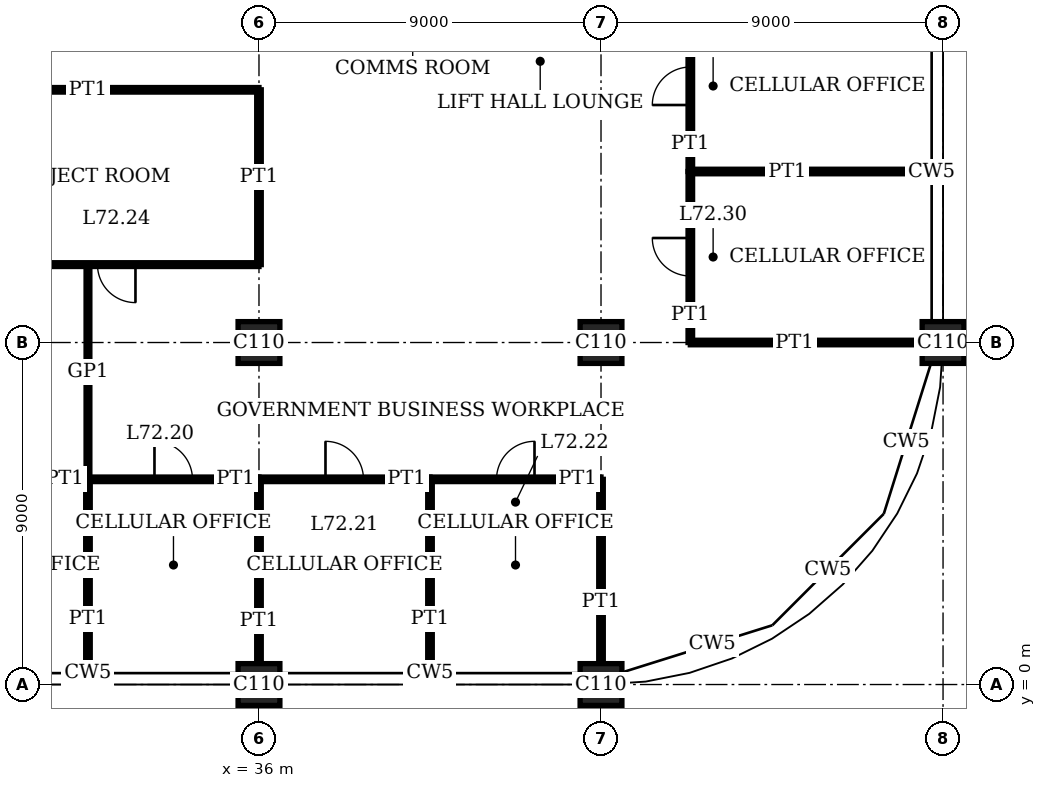
"""IFC4 building model, lengths in metres.
Left out: names, types, materials, properties, quantities, classifications, styles, units other than length and angle.
Written with IfcOpenShell. Run it as: python <this file> out.ifc"""

import sys

from ifc_helpers import new_model, si_unit, direction, frame, frame_2d, origin, origin_2d, place, context, subcontext, project, spatial, rectangle, extrude, element, fill, save


model = new_model("IFC4")
c1 = context("Model", 3, precision=1e-05, world=origin(), true_north=direction((0.0, 1.0)))
c2 = subcontext(c1, "Body", "Model", "MODEL_VIEW")
j1 = project(units=[si_unit("LENGTHUNIT", "METRE"), si_unit("PLANEANGLEUNIT", "RADIAN")], contexts=[c1])
p1 = place(None, origin())
s1 = spatial("IfcSite", under=j1, at=p1, CompositionType="ELEMENT")
p2 = place(p1, origin())
s2 = spatial("IfcBuilding", under=s1, at=p2, CompositionType="ELEMENT")
p3 = place(p2, frame((0.0, 0.0, 295.4)))
s3 = spatial("IfcBuildingStorey", under=s2, at=p3, CompositionType="ELEMENT", Elevation=295.4)
for number, where, z_axis, x_axis in (
    (1, (36.0, 0.0, 0.0), (0.0, 0.0, 1.0), (1.0, 0.0, 0.0)),
    (2, (36.0, 9.0, 0.0), (0.0, 0.0, 1.0), (1.0, 0.0, 0.0)),
    (3, (45.0, 0.0, 0.0), (0.0, 0.0, 1.0), (1.0, 0.0, 0.0)),
    (4, (45.0, 9.0, 0.0), (0.0, 0.0, 1.0), (1.0, 0.0, 0.0)),
    (5, (54.0, 9.0, 0.0), (0.0, 0.0, 1.0), (1.0, 0.0, 0.0)),
):
    element("IfcColumn", number, at=place(p3, frame(where, z_axis=z_axis, x_axis=x_axis)), inside=s3, PredefinedType="COLUMN", context=c2, shape_type="SweptSolid", body=[
        extrude(rectangle(XDim=1.1, YDim=1.1, at=origin_2d()), origin(), (0.0, 0.0, 1.0), 4.0),
    ])
p4 = place(p3, frame((27.0, 5.4, 0.0), z_axis=(0.0, 0.0, 1.0), x_axis=(1.0, 0.0, 0.0)))
e6 = element("IfcWall", 6, at=p4, inside=s3, PredefinedType="PARTITIONING", context=c2, shape_type="SweptSolid", body=[
    extrude(rectangle(XDim=4.5, YDim=0.12, at=frame_2d((2.25, 0.0))), origin(), (0.0, 0.0, 1.0), 3.75),
])
p5 = place(p4, frame((1.75, 0.0, 0.0)))
e7 = element("IfcOpeningElement", 7, at=p5, cuts=e6, PredefinedType="OPENING", context=c2, shape_type="SweptSolid", body=[
    extrude(rectangle(XDim=1.0, YDim=2.4, at=frame_2d((0.5, 1.2))), frame((0.0, 0.07, 0.0), z_axis=(0.0, -1.0, 0.0), x_axis=(1.0, 0.0, 0.0)), (0.0, 0.0, 1.0), 0.14),
])
p6 = place(p3, frame((31.5, 5.4, 0.0), z_axis=(0.0, 0.0, 1.0), x_axis=(1.0, 0.0, 0.0)))
e8 = element("IfcWall", 8, at=p6, inside=s3, PredefinedType="PARTITIONING", context=c2, shape_type="SweptSolid", body=[
    extrude(rectangle(XDim=4.5, YDim=0.12, at=frame_2d((2.25, 0.0))), origin(), (0.0, 0.0, 1.0), 3.75),
])
p7 = place(p6, frame((1.75, 0.0, 0.0)))
e9 = element("IfcOpeningElement", 9, at=p7, cuts=e8, PredefinedType="OPENING", context=c2, shape_type="SweptSolid", body=[
    extrude(rectangle(XDim=1.0, YDim=2.4, at=frame_2d((0.5, 1.2))), frame((0.0, 0.07, 0.0), z_axis=(0.0, -1.0, 0.0), x_axis=(1.0, 0.0, 0.0)), (0.0, 0.0, 1.0), 0.14),
])
p8 = place(p3, frame((36.0, 5.4, 0.0), z_axis=(0.0, 0.0, 1.0), x_axis=(1.0, 0.0, 0.0)))
e10 = element("IfcWall", 10, at=p8, inside=s3, PredefinedType="PARTITIONING", context=c2, shape_type="SweptSolid", body=[
    extrude(rectangle(XDim=4.5, YDim=0.12, at=frame_2d((2.25, 0.0))), origin(), (0.0, 0.0, 1.0), 3.75),
])
p9 = place(p8, frame((1.75, 0.0, 0.0)))
e11 = element("IfcOpeningElement", 11, at=p9, cuts=e10, PredefinedType="OPENING", context=c2, shape_type="SweptSolid", body=[
    extrude(rectangle(XDim=1.0, YDim=2.4, at=frame_2d((0.5, 1.2))), frame((0.0, 0.07, 0.0), z_axis=(0.0, -1.0, 0.0), x_axis=(1.0, 0.0, 0.0)), (0.0, 0.0, 1.0), 0.14),
])
p10 = place(p3, frame((40.5, 5.4, 0.0), z_axis=(0.0, 0.0, 1.0), x_axis=(1.0, 0.0, 0.0)))
e12 = element("IfcWall", 12, at=p10, inside=s3, PredefinedType="PARTITIONING", context=c2, shape_type="SweptSolid", body=[
    extrude(rectangle(XDim=4.5, YDim=0.12, at=frame_2d((2.25, 0.0))), origin(), (0.0, 0.0, 1.0), 3.75),
])
p11 = place(p10, frame((1.75, 0.0, 0.0)))
e13 = element("IfcOpeningElement", 13, at=p11, cuts=e12, PredefinedType="OPENING", context=c2, shape_type="SweptSolid", body=[
    extrude(rectangle(XDim=1.0, YDim=2.4, at=frame_2d((0.5, 1.2))), frame((0.0, 0.07, 0.0), z_axis=(0.0, -1.0, 0.0), x_axis=(1.0, 0.0, 0.0)), (0.0, 0.0, 1.0), 0.14),
])
p12 = place(p3, frame((47.35, 9.0, 0.0), z_axis=(0.0, 0.0, 1.0), x_axis=(1.0, 0.0, 0.0)))
e14 = element("IfcWall", 14, at=p12, inside=s3, PredefinedType="PARTITIONING", context=c2, shape_type="SweptSolid", body=[
    extrude(rectangle(XDim=6.1, YDim=0.12, at=frame_2d((3.05, 0.0))), origin(), (0.0, 0.0, 1.0), 3.05),
])
p13 = place(p3, frame((27.0, 11.05, 0.0), z_axis=(0.0, 0.0, 1.0), x_axis=(1.0, 0.0, 0.0)))
e15 = element("IfcWall", 15, at=p13, inside=s3, PredefinedType="PARTITIONING", context=c2, shape_type="SweptSolid", body=[
    extrude(rectangle(XDim=9.0, YDim=0.1, at=frame_2d((4.5, 0.0))), origin(), (0.0, 0.0, 1.0), 3.75),
])
p14 = place(p13, frame((4.75, 0.0, 0.0)))
e16 = element("IfcOpeningElement", 16, at=p14, cuts=e15, PredefinedType="OPENING", context=c2, shape_type="SweptSolid", body=[
    extrude(rectangle(XDim=1.0, YDim=2.4, at=frame_2d((0.5, 1.2))), frame((0.0, 0.06, 0.0), z_axis=(0.0, -1.0, 0.0), x_axis=(1.0, 0.0, 0.0)), (0.0, 0.0, 1.0), 0.12),
])
p15 = place(p3, frame((47.35, 13.5, 0.0), z_axis=(0.0, 0.0, 1.0), x_axis=(1.0, 0.0, 0.0)))
e17 = element("IfcWall", 17, at=p15, inside=s3, PredefinedType="PARTITIONING", context=c2, shape_type="SweptSolid", body=[
    extrude(rectangle(XDim=6.34, YDim=0.12, at=frame_2d((3.17, 0.0))), origin(), (0.0, 0.0, 1.0), 3.1),
])
p16 = place(p3, frame((27.0, 15.65, 0.0), z_axis=(0.0, 0.0, 1.0), x_axis=(1.0, 0.0, 0.0)))
e18 = element("IfcWall", 18, at=p16, inside=s3, PredefinedType="PARTITIONING", context=c2, shape_type="SweptSolid", body=[
    extrude(rectangle(XDim=9.0, YDim=0.12, at=frame_2d((4.5, 0.0))), origin(), (0.0, 0.0, 1.0), 3.75),
])
p17 = place(p3, frame((31.5, 0.31, 0.0), z_axis=(0.0, 0.0, 1.0), x_axis=(0.0, 1.0, 0.0)))
e19 = element("IfcWall", 19, at=p17, inside=s3, PredefinedType="PARTITIONING", context=c2, shape_type="SweptSolid", body=[
    extrude(rectangle(XDim=5.09, YDim=0.12, at=frame_2d((2.545, 0.0))), origin(), (0.0, 0.0, 1.0), 3.75),
])
p18 = place(p3, frame((31.5, 5.4, 0.0), z_axis=(0.0, 0.0, 1.0), x_axis=(0.0, 1.0, 0.0)))
e20 = element("IfcWall", 20, at=p18, inside=s3, PredefinedType="PARTITIONING", context=c2, shape_type="SweptSolid", body=[
    extrude(rectangle(XDim=5.66, YDim=0.1, at=frame_2d((2.83, 0.0))), origin(), (0.0, 0.0, 1.0), 3.75),
])
p19 = place(p3, frame((36.0, 0.55, 0.0), z_axis=(0.0, 0.0, 1.0), x_axis=(0.0, 1.0, 0.0)))
e21 = element("IfcWall", 21, at=p19, inside=s3, PredefinedType="PARTITIONING", context=c2, shape_type="SweptSolid", body=[
    extrude(rectangle(XDim=4.85, YDim=0.12, at=frame_2d((2.425, 0.0))), origin(), (0.0, 0.0, 1.0), 3.05),
])
p20 = place(p3, frame((36.0, 11.05, 0.0), z_axis=(0.0, 0.0, 1.0), x_axis=(0.0, 1.0, 0.0)))
e22 = element("IfcWall", 22, at=p20, inside=s3, PredefinedType="PARTITIONING", context=c2, shape_type="SweptSolid", body=[
    extrude(rectangle(XDim=4.6, YDim=0.12, at=frame_2d((2.3, 0.0))), origin(), (0.0, 0.0, 1.0), 3.05),
])
p21 = place(p3, frame((40.5, 0.31, 0.0), z_axis=(0.0, 0.0, 1.0), x_axis=(0.0, 1.0, 0.0)))
e23 = element("IfcWall", 23, at=p21, inside=s3, PredefinedType="PARTITIONING", context=c2, shape_type="SweptSolid", body=[
    extrude(rectangle(XDim=5.09, YDim=0.12, at=frame_2d((2.545, 0.0))), origin(), (0.0, 0.0, 1.0), 3.75),
])
p22 = place(p3, frame((45.0, 0.55, 0.0), z_axis=(0.0, 0.0, 1.0), x_axis=(0.0, 1.0, 0.0)))
e24 = element("IfcWall", 24, at=p22, inside=s3, PredefinedType="PARTITIONING", context=c2, shape_type="SweptSolid", body=[
    extrude(rectangle(XDim=4.85, YDim=0.12, at=frame_2d((2.425, 0.0))), origin(), (0.0, 0.0, 1.0), 3.05),
])
p23 = place(p3, frame((47.35, 9.0, 0.0), z_axis=(0.0, 0.0, 1.0), x_axis=(0.0, 1.0, 0.0)))
e25 = element("IfcWall", 25, at=p23, inside=s3, PredefinedType="PARTITIONING", context=c2, shape_type="SweptSolid", body=[
    extrude(rectangle(XDim=4.5, YDim=0.12, at=frame_2d((2.25, 0.0))), origin(), (0.0, 0.0, 1.0), 3.75),
])
p24 = place(p23, frame((1.75, 0.0, 0.0)))
e26 = element("IfcOpeningElement", 26, at=p24, cuts=e25, PredefinedType="OPENING", context=c2, shape_type="SweptSolid", body=[
    extrude(rectangle(XDim=1.0, YDim=2.4, at=frame_2d((0.5, 1.2))), frame((0.0, 0.07, 0.0), z_axis=(0.0, -1.0, 0.0), x_axis=(1.0, 0.0, 0.0)), (0.0, 0.0, 1.0), 0.14),
])
p25 = place(p3, frame((47.35, 13.5, 0.0), z_axis=(0.0, 0.0, 1.0), x_axis=(0.0, 1.0, 0.0)))
e27 = element("IfcWall", 27, at=p25, inside=s3, PredefinedType="PARTITIONING", context=c2, shape_type="SweptSolid", body=[
    extrude(rectangle(XDim=4.5, YDim=0.12, at=frame_2d((2.25, 0.0))), origin(), (0.0, 0.0, 1.0), 3.75),
])
p26 = place(p25, frame((1.75, 0.0, 0.0)))
e28 = element("IfcOpeningElement", 28, at=p26, cuts=e27, PredefinedType="OPENING", context=c2, shape_type="SweptSolid", body=[
    extrude(rectangle(XDim=1.0, YDim=2.4, at=frame_2d((0.5, 1.2))), frame((0.0, 0.07, 0.0), z_axis=(0.0, -1.0, 0.0), x_axis=(1.0, 0.0, 0.0)), (0.0, 0.0, 1.0), 0.14),
])
p27 = place(p7, origin())
e29 = element("IfcDoor", 29, at=p27, inside=s3, OperationType="SINGLE_SWING_RIGHT", PredefinedType="DOOR", context=c2, shape_type="SweptSolid", body=[
    extrude(rectangle(XDim=1.0, YDim=2.4, at=frame_2d((0.5, 1.2))), frame((0.0, 0.025, 0.0), z_axis=(0.0, -1.0, 0.0), x_axis=(1.0, 0.0, 0.0)), (0.0, 0.0, 1.0), 0.05),
])
fill(e9, e29)
p28 = place(p9, origin())
e30 = element("IfcDoor", 30, at=p28, inside=s3, OperationType="SINGLE_SWING_RIGHT", PredefinedType="DOOR", context=c2, shape_type="SweptSolid", body=[
    extrude(rectangle(XDim=1.0, YDim=2.4, at=frame_2d((0.5, 1.2))), frame((0.0, 0.025, 0.0), z_axis=(0.0, -1.0, 0.0), x_axis=(1.0, 0.0, 0.0)), (0.0, 0.0, 1.0), 0.05),
])
fill(e11, e30)
p29 = place(p11, origin())
e31 = element("IfcDoor", 31, at=p29, inside=s3, OperationType="SINGLE_SWING_LEFT", PredefinedType="DOOR", context=c2, shape_type="SweptSolid", body=[
    extrude(rectangle(XDim=1.0, YDim=2.4, at=frame_2d((0.5, 1.2))), frame((0.0, 0.025, 0.0), z_axis=(0.0, -1.0, 0.0), x_axis=(1.0, 0.0, 0.0)), (0.0, 0.0, 1.0), 0.05),
])
fill(e13, e31)
p30 = place(p14, origin())
e32 = element("IfcDoor", 32, at=p30, inside=s3, OperationType="SINGLE_SWING_RIGHT", PredefinedType="DOOR", context=c2, shape_type="SweptSolid", body=[
    extrude(rectangle(XDim=1.0, YDim=2.4, at=frame_2d((0.5, 1.2))), frame((0.0, 0.02, 0.0), z_axis=(0.0, -1.0, 0.0), x_axis=(1.0, 0.0, 0.0)), (0.0, 0.0, 1.0), 0.04),
])
fill(e16, e32)
p31 = place(p24, origin())
e33 = element("IfcDoor", 33, at=p31, inside=s3, OperationType="SINGLE_SWING_LEFT", PredefinedType="DOOR", context=c2, shape_type="SweptSolid", body=[
    extrude(rectangle(XDim=1.0, YDim=2.4, at=frame_2d((0.5, 1.2))), frame((0.0, 0.025, 0.0), z_axis=(0.0, -1.0, 0.0), x_axis=(1.0, 0.0, 0.0)), (0.0, 0.0, 1.0), 0.05),
])
fill(e26, e33)
p32 = place(p26, origin())
e34 = element("IfcDoor", 34, at=p32, inside=s3, OperationType="SINGLE_SWING_RIGHT", PredefinedType="DOOR", context=c2, shape_type="SweptSolid", body=[
    extrude(rectangle(XDim=1.0, YDim=2.4, at=frame_2d((0.5, 1.2))), frame((0.0, 0.025, 0.0), z_axis=(0.0, -1.0, 0.0), x_axis=(1.0, 0.0, 0.0)), (0.0, 0.0, 1.0), 0.05),
])
fill(e28, e34)
save(model, sys.argv[1])
